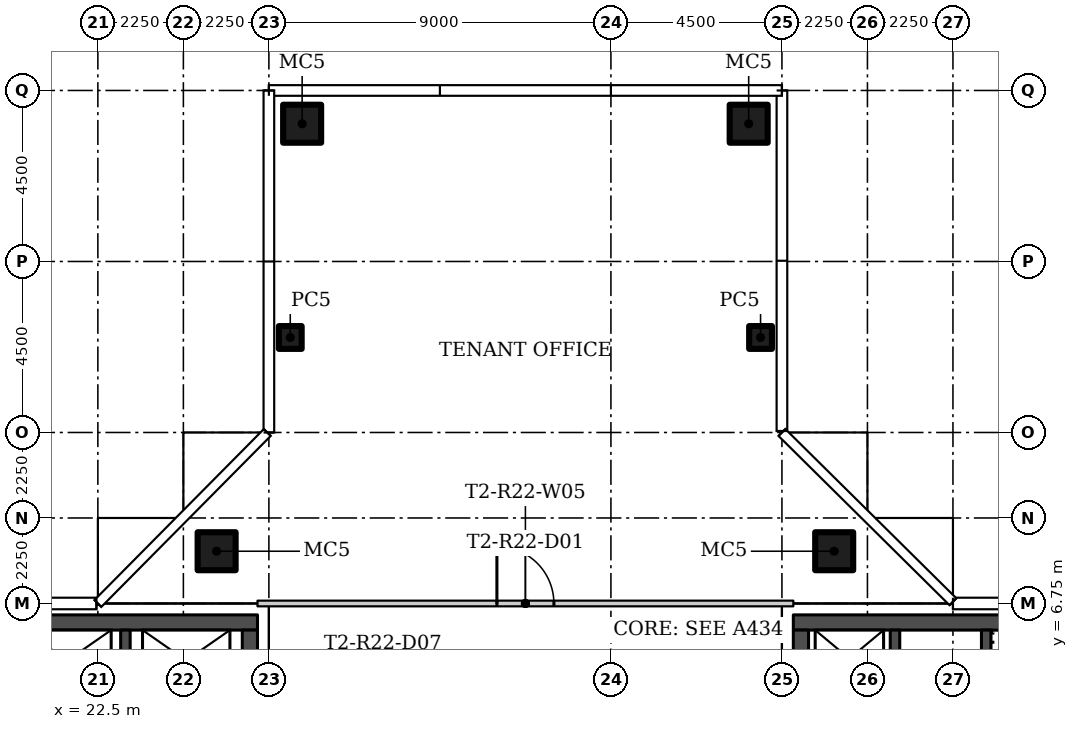
"""IFC4 building model, lengths in metres.
Left out: names, types, materials, properties, quantities, classifications, styles, units other than length and angle.
Written with IfcOpenShell. Run it as: python <this file> out.ifc"""

import sys

from ifc_helpers import new_model, si_unit, direction, frame, frame_2d, origin, origin_2d, place, context, subcontext, project, spatial, rectangle, hollow_rectangle, extrude, element, fill, save


model = new_model("IFC4")
c1 = context("Model", 3, precision=1e-05, world=origin(), true_north=direction((0.0, 1.0)))
c2 = subcontext(c1, "Body", "Model", "MODEL_VIEW")
j1 = project(units=[si_unit("LENGTHUNIT", "METRE"), si_unit("PLANEANGLEUNIT", "RADIAN")], contexts=[c1])
p1 = place(None, origin())
s1 = spatial("IfcSite", under=j1, at=p1, CompositionType="ELEMENT")
p2 = place(p1, origin())
s2 = spatial("IfcBuilding", under=s1, at=p2, CompositionType="ELEMENT")
p3 = place(p2, frame((0.0, 0.0, 202.2)))
s3 = spatial("IfcBuildingStorey", under=s2, at=p3, CompositionType="ELEMENT", Elevation=202.2)
for number, where in (
    (1, (25.625, 8.125, 0.0)),
    (2, (41.875, 8.125, 0.0)),
):
    element("IfcColumn", number, at=place(p3, frame(where)), inside=s3, PredefinedType="COLUMN", context=c2, shape_type="SweptSolid", body=[
        extrude(hollow_rectangle(XDim=1.0, YDim=1.0, WallThickness=0.04, at=origin_2d()), origin(), (0.0, 0.0, 1.0), 3.55),
    ])
p4 = place(p3, frame((39.938, 13.75, 0.0)))
e3 = element("IfcColumn", 3, at=p4, inside=s3, PredefinedType="COLUMN", context=c2, shape_type="SweptSolid", body=[
    extrude(hollow_rectangle(XDim=0.6, YDim=0.6, WallThickness=0.02, at=origin_2d()), origin(), (0.0, 0.0, 1.0), 3.55),
])
p5 = place(p3, frame((39.625, 19.375, 0.0)))
e4 = element("IfcColumn", 4, at=p5, inside=s3, PredefinedType="COLUMN", context=c2, shape_type="SweptSolid", body=[
    extrude(hollow_rectangle(XDim=1.0, YDim=1.0, WallThickness=0.04, at=origin_2d()), origin(), (0.0, 0.0, 1.0), 3.55),
])
p6 = place(p3, frame((27.562, 13.75, 0.0)))
e5 = element("IfcColumn", 5, at=p6, inside=s3, PredefinedType="COLUMN", context=c2, shape_type="SweptSolid", body=[
    extrude(hollow_rectangle(XDim=0.6, YDim=0.6, WallThickness=0.02, at=origin_2d()), origin(), (0.0, 0.0, 1.0), 3.55),
])
p7 = place(p3, frame((27.875, 19.375, 0.0)))
e6 = element("IfcColumn", 6, at=p7, inside=s3, PredefinedType="COLUMN", context=c2, shape_type="SweptSolid", body=[
    extrude(hollow_rectangle(XDim=1.0, YDim=1.0, WallThickness=0.04, at=origin_2d()), origin(), (0.0, 0.0, 1.0), 3.55),
])
p8 = place(p3, frame((26.7, 6.75, 0.0)))
e7 = element("IfcWall", 7, at=p8, inside=s3, PredefinedType="PARTITIONING", context=c2, shape_type="SweptSolid", body=[
    extrude(rectangle(XDim=14.1, YDim=0.15, at=frame_2d((7.05, 0.0))), origin(), (0.0, 0.0, 1.0), 3.55),
])
p9 = place(p8, frame((6.3, 0.0, 0.0)))
e8 = element("IfcOpeningElement", 8, at=p9, cuts=e7, PredefinedType="OPENING", context=c2, shape_type="SweptSolid", body=[
    extrude(rectangle(XDim=1.5, YDim=2.1, at=frame_2d((0.75, 1.05))), frame((0.0, 0.085, 0.0), z_axis=(0.0, -1.0, 0.0), x_axis=(1.0, 0.0, 0.0)), (0.0, 0.0, 1.0), 0.17),
])
p10 = place(p3, frame((13.8, 6.25, 0.0)))
e9 = element("IfcWall", 9, at=p10, inside=s3, PredefinedType="SHEAR", context=c2, shape_type="SweptSolid", body=[
    extrude(rectangle(XDim=12.9, YDim=0.4, at=frame_2d((6.45, 0.0))), origin(), (0.0, 0.0, 1.0), 3.55),
])
p11 = place(p3, frame((26.5, 6.05, 0.0), z_axis=(0.0, 0.0, 1.0), x_axis=(0.0, -1.0, 0.0)))
e10 = element("IfcWall", 10, at=p11, inside=s3, PredefinedType="SHEAR", context=c2, shape_type="SweptSolid", body=[
    extrude(rectangle(XDim=12.1, YDim=0.4, at=frame_2d((6.05, 0.0))), origin(), (0.0, 0.0, 1.0), 3.55),
])
p12 = place(p11, frame((10.1, 0.0, 0.0)))
e11 = element("IfcOpeningElement", 11, at=p12, cuts=e10, PredefinedType="OPENING", context=c2, shape_type="SweptSolid", body=[
    extrude(rectangle(XDim=1.2, YDim=2.1, at=frame_2d((0.6, 1.05))), frame((0.0, 0.21, 0.0), z_axis=(0.0, -1.0, 0.0), x_axis=(1.0, 0.0, 0.0)), (0.0, 0.0, 1.0), 0.42),
])
p13 = place(p11, frame((3.9, 0.0, 0.0)))
e12 = element("IfcOpeningElement", 12, at=p13, cuts=e10, PredefinedType="OPENING", context=c2, shape_type="SweptSolid", body=[
    extrude(rectangle(XDim=1.8, YDim=2.4, at=frame_2d((0.9, 1.2))), frame((0.0, 0.21, 0.0), z_axis=(0.0, -1.0, 0.0), x_axis=(1.0, 0.0, 0.0)), (0.0, 0.0, 1.0), 0.42),
])
p14 = place(p3, frame((23.225, 3.25, 0.0), z_axis=(0.0, 0.0, 1.0), x_axis=(0.0, 1.0, 0.0)))
e13 = element("IfcWall", 13, at=p14, inside=s3, PredefinedType="SHEAR", context=c2, shape_type="SweptSolid", body=[
    extrude(rectangle(XDim=2.8, YDim=0.25, at=frame_2d((1.4, 0.0))), origin(), (0.0, 0.0, 1.0), 3.55),
])
p15 = place(p3, frame((53.7, 6.25, 0.0), z_axis=(0.0, 0.0, 1.0), x_axis=(-1.0, 0.0, 0.0)))
e14 = element("IfcWall", 14, at=p15, inside=s3, PredefinedType="SHEAR", context=c2, shape_type="SweptSolid", body=[
    extrude(rectangle(XDim=12.9, YDim=0.4, at=frame_2d((6.45, 0.0))), origin(), (0.0, 0.0, 1.0), 3.55),
])
p16 = place(p3, frame((41.0, -6.05, 0.0), z_axis=(0.0, 0.0, 1.0), x_axis=(0.0, 1.0, 0.0)))
e15 = element("IfcWall", 15, at=p16, inside=s3, PredefinedType="SHEAR", context=c2, shape_type="SweptSolid", body=[
    extrude(rectangle(XDim=12.1, YDim=0.4, at=frame_2d((6.05, 0.0))), origin(), (0.0, 0.0, 1.0), 3.55),
])
p17 = place(p16, frame((0.8, 0.0, 0.0)))
e16 = element("IfcOpeningElement", 16, at=p17, cuts=e15, PredefinedType="OPENING", context=c2, shape_type="SweptSolid", body=[
    extrude(rectangle(XDim=1.2, YDim=2.1, at=frame_2d((0.6, 1.05))), frame((0.0, 0.21, 0.0), z_axis=(0.0, -1.0, 0.0), x_axis=(1.0, 0.0, 0.0)), (0.0, 0.0, 1.0), 0.42),
])
p18 = place(p16, frame((6.4, 0.0, 0.0)))
e17 = element("IfcOpeningElement", 17, at=p18, cuts=e15, PredefinedType="OPENING", context=c2, shape_type="SweptSolid", body=[
    extrude(rectangle(XDim=1.8, YDim=2.4, at=frame_2d((0.9, 1.2))), frame((0.0, 0.21, 0.0), z_axis=(0.0, -1.0, 0.0), x_axis=(1.0, 0.0, 0.0)), (0.0, 0.0, 1.0), 0.42),
])
for number, where, z_axis, x_axis in (
    (18, (45.875, 3.25, 0.0), (0.0, 0.0, 1.0), (0.0, 1.0, 0.0)),
    (19, (43.475, 3.25, 0.0), (0.0, 0.0, 1.0), (0.0, 1.0, 0.0)),
):
    element("IfcWall", number, at=place(p3, frame(where, z_axis=z_axis, x_axis=x_axis)), inside=s3, PredefinedType="SHEAR", context=c2, shape_type="SweptSolid", body=[
        extrude(rectangle(XDim=2.8, YDim=0.25, at=frame_2d((1.4, 0.0))), origin(), (0.0, 0.0, 1.0), 3.55),
    ])
p19 = place(p9, origin())
e20 = element("IfcDoor", 20, at=p19, inside=s3, OperationType="DOUBLE_DOOR_SINGLE_SWING", PredefinedType="DOOR", context=c2, shape_type="SweptSolid", body=[
    extrude(rectangle(XDim=1.5, YDim=2.1, at=frame_2d((0.75, 1.05))), frame((0.0, 0.025, 0.0), z_axis=(0.0, -1.0, 0.0), x_axis=(1.0, 0.0, 0.0)), (0.0, 0.0, 1.0), 0.05),
])
fill(e8, e20)
save(model, sys.argv[1])
